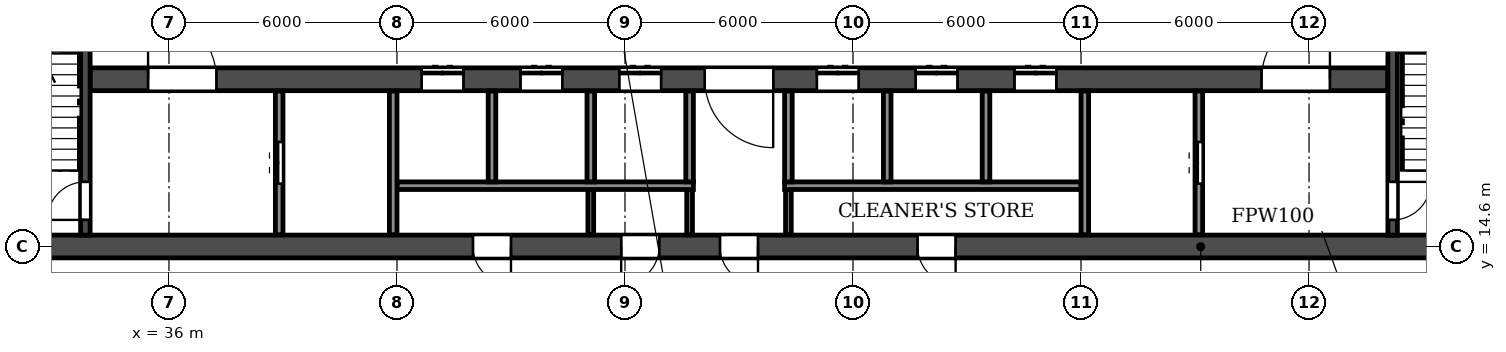
"""IFC4 building model, lengths in metres.
Left out: names, types, materials, properties, quantities, classifications, styles, units other than length and angle.
Written with IfcOpenShell. Run it as: python <this file> out.ifc"""

import sys

from ifc_helpers import new_model, si_unit, direction, frame, frame_2d, origin, place, context, subcontext, project, spatial, rectangle, extrude, element, fill, save


model = new_model("IFC4")
c1 = context("Model", 3, precision=1e-05, world=origin(), true_north=direction((0.0, 1.0)))
c2 = subcontext(c1, "Body", "Model", "MODEL_VIEW")
j1 = project(units=[si_unit("LENGTHUNIT", "METRE"), si_unit("PLANEANGLEUNIT", "RADIAN")], contexts=[c1])
p1 = place(None, origin())
s1 = spatial("IfcSite", under=j1, at=p1, CompositionType="ELEMENT")
p2 = place(p1, origin())
s2 = spatial("IfcBuilding", under=s1, at=p2, CompositionType="ELEMENT")
p3 = place(p2, frame((0.0, 0.0, 63.0)))
s3 = spatial("IfcBuildingStorey", under=s2, at=p3, CompositionType="ELEMENT", Elevation=63.0)
p4 = place(p3, frame((8.6, 14.6, 0.0), z_axis=(0.0, 0.0, 1.0), x_axis=(1.0, 0.0, 0.0)))
e1 = element("IfcWall", 1, at=p4, inside=s3, PredefinedType="SOLIDWALL", context=c2, shape_type="SweptSolid", body=[
    extrude(rectangle(XDim=84.8, YDim=0.6, at=frame_2d((42.4, 0.0))), origin(), (0.0, 0.0, 1.0), 2.95),
])
p5 = place(p4, frame((1.35, 0.0, 0.0)))
e2 = element("IfcOpeningElement", 2, at=p5, cuts=e1, PredefinedType="OPENING", context=c2, shape_type="SweptSolid", body=[
    extrude(rectangle(XDim=1.0, YDim=2.1, at=frame_2d((0.5, 1.05))), frame((0.0, 0.31, 0.0), z_axis=(0.0, -1.0, 0.0), x_axis=(1.0, 0.0, 0.0)), (0.0, 0.0, 1.0), 0.62),
])
p6 = place(p4, frame((6.05, 0.0, 0.0)))
e3 = element("IfcOpeningElement", 3, at=p6, cuts=e1, PredefinedType="OPENING", context=c2, shape_type="SweptSolid", body=[
    extrude(rectangle(XDim=1.0, YDim=2.1, at=frame_2d((0.5, 1.05))), frame((0.0, 0.31, 0.0), z_axis=(0.0, -1.0, 0.0), x_axis=(1.0, 0.0, 0.0)), (0.0, 0.0, 1.0), 0.62),
])
p7 = place(p4, frame((10.3, 0.0, 0.0)))
e4 = element("IfcOpeningElement", 4, at=p7, cuts=e1, PredefinedType="OPENING", context=c2, shape_type="SweptSolid", body=[
    extrude(rectangle(XDim=1.0, YDim=2.1, at=frame_2d((0.5, 1.05))), frame((0.0, 0.31, 0.0), z_axis=(0.0, -1.0, 0.0), x_axis=(1.0, 0.0, 0.0)), (0.0, 0.0, 1.0), 0.62),
])
p8 = place(p4, frame((18.2, 0.0, 0.0)))
e5 = element("IfcOpeningElement", 5, at=p8, cuts=e1, PredefinedType="OPENING", context=c2, shape_type="SweptSolid", body=[
    extrude(rectangle(XDim=1.0, YDim=2.1, at=frame_2d((0.5, 1.05))), frame((0.0, 0.31, 0.0), z_axis=(0.0, -1.0, 0.0), x_axis=(1.0, 0.0, 0.0)), (0.0, 0.0, 1.0), 0.62),
])
p9 = place(p4, frame((22.8, 0.0, 0.0)))
e6 = element("IfcOpeningElement", 6, at=p9, cuts=e1, PredefinedType="OPENING", context=c2, shape_type="SweptSolid", body=[
    extrude(rectangle(XDim=1.0, YDim=2.1, at=frame_2d((0.5, 1.05))), frame((0.0, 0.31, 0.0), z_axis=(0.0, -1.0, 0.0), x_axis=(1.0, 0.0, 0.0)), (0.0, 0.0, 1.0), 0.62),
])
p10 = place(p4, frame((35.4, 0.0, 0.0)))
e7 = element("IfcOpeningElement", 7, at=p10, cuts=e1, PredefinedType="OPENING", context=c2, shape_type="SweptSolid", body=[
    extrude(rectangle(XDim=1.0, YDim=2.1, at=frame_2d((0.5, 1.05))), frame((0.0, 0.31, 0.0), z_axis=(0.0, -1.0, 0.0), x_axis=(1.0, 0.0, 0.0)), (0.0, 0.0, 1.0), 0.62),
])
p11 = place(p4, frame((39.3, 0.0, 0.0)))
e8 = element("IfcOpeningElement", 8, at=p11, cuts=e1, PredefinedType="OPENING", context=c2, shape_type="SweptSolid", body=[
    extrude(rectangle(XDim=1.0, YDim=2.1, at=frame_2d((0.5, 1.05))), frame((0.0, 0.31, 0.0), z_axis=(0.0, -1.0, 0.0), x_axis=(1.0, 0.0, 0.0)), (0.0, 0.0, 1.0), 0.62),
])
p12 = place(p4, frame((41.9, 0.0, 0.0)))
e9 = element("IfcOpeningElement", 9, at=p12, cuts=e1, PredefinedType="OPENING", context=c2, shape_type="SweptSolid", body=[
    extrude(rectangle(XDim=1.0, YDim=2.1, at=frame_2d((0.5, 1.05))), frame((0.0, 0.31, 0.0), z_axis=(0.0, -1.0, 0.0), x_axis=(1.0, 0.0, 0.0)), (0.0, 0.0, 1.0), 0.62),
])
p13 = place(p4, frame((47.1, 0.0, 0.0)))
e10 = element("IfcOpeningElement", 10, at=p13, cuts=e1, PredefinedType="OPENING", context=c2, shape_type="SweptSolid", body=[
    extrude(rectangle(XDim=1.0, YDim=2.1, at=frame_2d((0.5, 1.05))), frame((0.0, 0.31, 0.0), z_axis=(0.0, -1.0, 0.0), x_axis=(1.0, 0.0, 0.0)), (0.0, 0.0, 1.0), 0.62),
])
p14 = place(p4, frame((61.0, 0.0, 0.0)))
e11 = element("IfcOpeningElement", 11, at=p14, cuts=e1, PredefinedType="OPENING", context=c2, shape_type="SweptSolid", body=[
    extrude(rectangle(XDim=1.0, YDim=2.1, at=frame_2d((0.5, 1.05))), frame((0.0, 0.31, 0.0), z_axis=(0.0, -1.0, 0.0), x_axis=(1.0, 0.0, 0.0)), (0.0, 0.0, 1.0), 0.62),
])
p15 = place(p4, frame((65.6, 0.0, 0.0)))
e12 = element("IfcOpeningElement", 12, at=p15, cuts=e1, PredefinedType="OPENING", context=c2, shape_type="SweptSolid", body=[
    extrude(rectangle(XDim=1.0, YDim=2.1, at=frame_2d((0.5, 1.05))), frame((0.0, 0.31, 0.0), z_axis=(0.0, -1.0, 0.0), x_axis=(1.0, 0.0, 0.0)), (0.0, 0.0, 1.0), 0.62),
])
p16 = place(p4, frame((73.5, 0.0, 0.0)))
e13 = element("IfcOpeningElement", 13, at=p16, cuts=e1, PredefinedType="OPENING", context=c2, shape_type="SweptSolid", body=[
    extrude(rectangle(XDim=1.0, YDim=2.1, at=frame_2d((0.5, 1.05))), frame((0.0, 0.31, 0.0), z_axis=(0.0, -1.0, 0.0), x_axis=(1.0, 0.0, 0.0)), (0.0, 0.0, 1.0), 0.62),
])
p17 = place(p4, frame((77.9, 0.0, 0.0)))
e14 = element("IfcOpeningElement", 14, at=p17, cuts=e1, PredefinedType="OPENING", context=c2, shape_type="SweptSolid", body=[
    extrude(rectangle(XDim=1.0, YDim=2.1, at=frame_2d((0.5, 1.05))), frame((0.0, 0.31, 0.0), z_axis=(0.0, -1.0, 0.0), x_axis=(1.0, 0.0, 0.0)), (0.0, 0.0, 1.0), 0.62),
])
p18 = place(p4, frame((82.6, 0.0, 0.0)))
e15 = element("IfcOpeningElement", 15, at=p18, cuts=e1, PredefinedType="OPENING", context=c2, shape_type="SweptSolid", body=[
    extrude(rectangle(XDim=1.0, YDim=2.1, at=frame_2d((0.5, 1.05))), frame((0.0, 0.31, 0.0), z_axis=(0.0, -1.0, 0.0), x_axis=(1.0, 0.0, 0.0)), (0.0, 0.0, 1.0), 0.62),
])
p19 = place(p3, frame((33.925, 19.0, 0.0), z_axis=(0.0, 0.0, 1.0), x_axis=(1.0, 0.0, 0.0)))
e16 = element("IfcWall", 16, at=p19, inside=s3, PredefinedType="SOLIDWALL", context=c2, shape_type="SweptSolid", body=[
    extrude(rectangle(XDim=34.15, YDim=0.6, at=frame_2d((17.075, 0.0))), origin(), (0.0, 0.0, 1.0), 2.95),
])
p20 = place(p19, frame((16.175, 0.0, 0.0)))
e17 = element("IfcOpeningElement", 17, at=p20, cuts=e16, PredefinedType="OPENING", context=c2, shape_type="SweptSolid", body=[
    extrude(rectangle(XDim=1.8, YDim=2.1, at=frame_2d((0.9, 1.05))), frame((0.0, 0.31, 0.0), z_axis=(0.0, -1.0, 0.0), x_axis=(1.0, 0.0, 0.0)), (0.0, 0.0, 1.0), 0.62),
])
p21 = place(p19, frame((1.525, 0.0, 0.0)))
e18 = element("IfcOpeningElement", 18, at=p21, cuts=e16, PredefinedType="OPENING", context=c2, shape_type="SweptSolid", body=[
    extrude(rectangle(XDim=1.8, YDim=2.1, at=frame_2d((0.9, 1.05))), frame((0.0, 0.31, 0.0), z_axis=(0.0, -1.0, 0.0), x_axis=(1.0, 0.0, 0.0)), (0.0, 0.0, 1.0), 0.62),
])
p22 = place(p19, frame((8.725, 0.0, 0.0)))
e19 = element("IfcOpeningElement", 19, at=p22, cuts=e16, PredefinedType="OPENING", context=c2, shape_type="SweptSolid", body=[
    extrude(rectangle(XDim=1.1, YDim=2.1, at=frame_2d((0.55, 1.05))), frame((0.0, 0.31, 0.0), z_axis=(0.0, -1.0, 0.0), x_axis=(1.0, 0.0, 0.0)), (0.0, 0.0, 1.0), 0.62),
])
p23 = place(p19, frame((11.325, 0.0, 0.0)))
e20 = element("IfcOpeningElement", 20, at=p23, cuts=e16, PredefinedType="OPENING", context=c2, shape_type="SweptSolid", body=[
    extrude(rectangle(XDim=1.1, YDim=2.1, at=frame_2d((0.55, 1.05))), frame((0.0, 0.31, 0.0), z_axis=(0.0, -1.0, 0.0), x_axis=(1.0, 0.0, 0.0)), (0.0, 0.0, 1.0), 0.62),
])
p24 = place(p19, frame((13.925, 0.0, 0.0)))
e21 = element("IfcOpeningElement", 21, at=p24, cuts=e16, PredefinedType="OPENING", context=c2, shape_type="SweptSolid", body=[
    extrude(rectangle(XDim=1.1, YDim=2.1, at=frame_2d((0.55, 1.05))), frame((0.0, 0.31, 0.0), z_axis=(0.0, -1.0, 0.0), x_axis=(1.0, 0.0, 0.0)), (0.0, 0.0, 1.0), 0.62),
])
p25 = place(p19, frame((19.125, 0.0, 0.0)))
e22 = element("IfcOpeningElement", 22, at=p25, cuts=e16, PredefinedType="OPENING", context=c2, shape_type="SweptSolid", body=[
    extrude(rectangle(XDim=1.1, YDim=2.1, at=frame_2d((0.55, 1.05))), frame((0.0, 0.31, 0.0), z_axis=(0.0, -1.0, 0.0), x_axis=(1.0, 0.0, 0.0)), (0.0, 0.0, 1.0), 0.62),
])
p26 = place(p19, frame((21.725, 0.0, 0.0)))
e23 = element("IfcOpeningElement", 23, at=p26, cuts=e16, PredefinedType="OPENING", context=c2, shape_type="SweptSolid", body=[
    extrude(rectangle(XDim=1.1, YDim=2.1, at=frame_2d((0.55, 1.05))), frame((0.0, 0.31, 0.0), z_axis=(0.0, -1.0, 0.0), x_axis=(1.0, 0.0, 0.0)), (0.0, 0.0, 1.0), 0.62),
])
p27 = place(p19, frame((24.325, 0.0, 0.0)))
e24 = element("IfcOpeningElement", 24, at=p27, cuts=e16, PredefinedType="OPENING", context=c2, shape_type="SweptSolid", body=[
    extrude(rectangle(XDim=1.1, YDim=2.1, at=frame_2d((0.55, 1.05))), frame((0.0, 0.31, 0.0), z_axis=(0.0, -1.0, 0.0), x_axis=(1.0, 0.0, 0.0)), (0.0, 0.0, 1.0), 0.62),
])
p28 = place(p19, frame((30.825, 0.0, 0.0)))
e25 = element("IfcOpeningElement", 25, at=p28, cuts=e16, PredefinedType="OPENING", context=c2, shape_type="SweptSolid", body=[
    extrude(rectangle(XDim=1.8, YDim=2.1, at=frame_2d((0.9, 1.05))), frame((0.0, 0.31, 0.0), z_axis=(0.0, -1.0, 0.0), x_axis=(1.0, 0.0, 0.0)), (0.0, 0.0, 1.0), 0.62),
])
p29 = place(p3, frame((33.8, 14.9, 0.0), z_axis=(0.0, 0.0, 1.0), x_axis=(0.0, 1.0, 0.0)))
e26 = element("IfcWall", 26, at=p29, inside=s3, PredefinedType="SOLIDWALL", context=c2, shape_type="SweptSolid", body=[
    extrude(rectangle(XDim=7.575, YDim=0.25, at=frame_2d((3.788, 0.0))), origin(), (0.0, 0.0, 1.0), 2.95),
])
p30 = place(p29, frame((0.4, 0.0, 0.0)))
e27 = element("IfcOpeningElement", 27, at=p30, cuts=e26, PredefinedType="OPENING", context=c2, shape_type="SweptSolid", body=[
    extrude(rectangle(XDim=1.0, YDim=2.1, at=frame_2d((0.5, 1.05))), frame((0.0, 0.135, 0.0), z_axis=(0.0, -1.0, 0.0), x_axis=(1.0, 0.0, 0.0)), (0.0, 0.0, 1.0), 0.27),
])
p31 = place(p3, frame((68.2, 14.9, 0.0), z_axis=(0.0, 0.0, 1.0), x_axis=(0.0, 1.0, 0.0)))
e28 = element("IfcWall", 28, at=p31, inside=s3, PredefinedType="SOLIDWALL", context=c2, shape_type="SweptSolid", body=[
    extrude(rectangle(XDim=7.575, YDim=0.25, at=frame_2d((3.788, 0.0))), origin(), (0.0, 0.0, 1.0), 2.95),
])
p32 = place(p31, frame((0.4, 0.0, 0.0)))
e29 = element("IfcOpeningElement", 29, at=p32, cuts=e28, PredefinedType="OPENING", context=c2, shape_type="SweptSolid", body=[
    extrude(rectangle(XDim=1.0, YDim=2.1, at=frame_2d((0.5, 1.05))), frame((0.0, 0.135, 0.0), z_axis=(0.0, -1.0, 0.0), x_axis=(1.0, 0.0, 0.0)), (0.0, 0.0, 1.0), 0.27),
])
for number, where, z_axis, x_axis in (
    (30, (49.7, 14.91, 0.0), (0.0, 0.0, 1.0), (0.0, 1.0, 0.0)),
    (31, (52.3, 14.91, 0.0), (0.0, 0.0, 1.0), (0.0, 1.0, 0.0)),
    (32, (47.1, 14.91, 0.0), (0.0, 0.0, 1.0), (0.0, 1.0, 0.0)),
):
    element("IfcWall", number, at=place(p3, frame(where, z_axis=z_axis, x_axis=x_axis)), inside=s3, PredefinedType="PARTITIONING", context=c2, shape_type="SweptSolid", body=[
        extrude(rectangle(XDim=1.19, YDim=0.15, at=frame_2d((0.595, 0.0))), origin(), (0.0, 0.0, 1.0), 2.95),
    ])
for number, where, z_axis, x_axis in (
    (33, (42.0, 16.2, 0.0), (0.0, 0.0, 1.0), (1.0, 0.0, 0.0)),
    (34, (52.2, 16.2, 0.0), (0.0, 0.0, 1.0), (1.0, 0.0, 0.0)),
):
    element("IfcWall", number, at=place(p3, frame(where, z_axis=z_axis, x_axis=x_axis)), inside=s3, PredefinedType="PARTITIONING", context=c2, shape_type="SweptSolid", body=[
        extrude(rectangle(XDim=7.8, YDim=0.2, at=frame_2d((3.9, 0.0))), origin(), (0.0, 0.0, 1.0), 2.95),
    ])
p33 = place(p3, frame((38.9, 14.91, 0.0), z_axis=(0.0, 0.0, 1.0), x_axis=(0.0, 1.0, 0.0)))
e35 = element("IfcWall", 35, at=p33, inside=s3, PredefinedType="PARTITIONING", context=c2, shape_type="SweptSolid", body=[
    extrude(rectangle(XDim=3.78, YDim=0.2, at=frame_2d((1.89, 0.0))), origin(), (0.0, 0.0, 1.0), 2.95),
])
p34 = place(p33, frame((1.34, 0.0, 0.0)))
e36 = element("IfcOpeningElement", 36, at=p34, cuts=e35, PredefinedType="OPENING", context=c2, shape_type="SweptSolid", body=[
    extrude(rectangle(XDim=1.1, YDim=2.1, at=frame_2d((0.55, 1.05))), frame((0.0, 0.11, 0.0), z_axis=(0.0, -1.0, 0.0), x_axis=(1.0, 0.0, 0.0)), (0.0, 0.0, 1.0), 0.22),
])
p35 = place(p3, frame((41.9, 14.91, 0.0), z_axis=(0.0, 0.0, 1.0), x_axis=(0.0, 1.0, 0.0)))
e37 = element("IfcWall", 37, at=p35, inside=s3, PredefinedType="PARTITIONING", context=c2, shape_type="SweptSolid", body=[
    extrude(rectangle(XDim=3.78, YDim=0.2, at=frame_2d((1.89, 0.0))), origin(), (0.0, 0.0, 1.0), 2.95),
])
for number, where, z_axis, x_axis in (
    (38, (44.5, 16.3, 0.0), (0.0, 0.0, 1.0), (0.0, 1.0, 0.0)),
    (39, (47.1, 16.3, 0.0), (0.0, 0.0, 1.0), (0.0, 1.0, 0.0)),
    (40, (49.7, 16.3, 0.0), (0.0, 0.0, 1.0), (0.0, 1.0, 0.0)),
    (41, (52.3, 16.3, 0.0), (0.0, 0.0, 1.0), (0.0, 1.0, 0.0)),
    (42, (54.9, 16.3, 0.0), (0.0, 0.0, 1.0), (0.0, 1.0, 0.0)),
    (43, (57.5, 16.3, 0.0), (0.0, 0.0, 1.0), (0.0, 1.0, 0.0)),
):
    element("IfcWall", number, at=place(p3, frame(where, z_axis=z_axis, x_axis=x_axis)), inside=s3, PredefinedType="PARTITIONING", context=c2, shape_type="SweptSolid", body=[
        extrude(rectangle(XDim=2.39, YDim=0.2, at=frame_2d((1.195, 0.0))), origin(), (0.0, 0.0, 1.0), 2.95),
    ])
p36 = place(p3, frame((60.1, 14.91, 0.0), z_axis=(0.0, 0.0, 1.0), x_axis=(0.0, 1.0, 0.0)))
e44 = element("IfcWall", 44, at=p36, inside=s3, PredefinedType="PARTITIONING", context=c2, shape_type="SweptSolid", body=[
    extrude(rectangle(XDim=3.78, YDim=0.2, at=frame_2d((1.89, 0.0))), origin(), (0.0, 0.0, 1.0), 2.95),
])
p37 = place(p3, frame((63.1, 14.91, 0.0), z_axis=(0.0, 0.0, 1.0), x_axis=(0.0, 1.0, 0.0)))
e45 = element("IfcWall", 45, at=p37, inside=s3, PredefinedType="PARTITIONING", context=c2, shape_type="SweptSolid", body=[
    extrude(rectangle(XDim=3.78, YDim=0.2, at=frame_2d((1.89, 0.0))), origin(), (0.0, 0.0, 1.0), 2.95),
])
p38 = place(p37, frame((1.34, 0.0, 0.0)))
e46 = element("IfcOpeningElement", 46, at=p38, cuts=e45, PredefinedType="OPENING", context=c2, shape_type="SweptSolid", body=[
    extrude(rectangle(XDim=1.1, YDim=2.1, at=frame_2d((0.55, 1.05))), frame((0.0, 0.11, 0.0), z_axis=(0.0, -1.0, 0.0), x_axis=(1.0, 0.0, 0.0)), (0.0, 0.0, 1.0), 0.22),
])
p39 = place(p10, frame((1.0, 0.0, 0.0), z_axis=(0.0, 0.0, 1.0), x_axis=(-1.0, 0.0, 0.0)))
e47 = element("IfcDoor", 47, at=p39, inside=s3, OperationType="SINGLE_SWING_LEFT", PredefinedType="DOOR", context=c2, shape_type="SweptSolid", body=[
    extrude(rectangle(XDim=1.0, YDim=2.1, at=frame_2d((0.5, 1.05))), frame((0.0, 0.025, 0.0), z_axis=(0.0, -1.0, 0.0), x_axis=(1.0, 0.0, 0.0)), (0.0, 0.0, 1.0), 0.05),
])
fill(e7, e47)
p40 = place(p11, frame((1.0, 0.0, 0.0), z_axis=(0.0, 0.0, 1.0), x_axis=(-1.0, 0.0, 0.0)))
e48 = element("IfcDoor", 48, at=p40, inside=s3, OperationType="SINGLE_SWING_RIGHT", PredefinedType="DOOR", context=c2, shape_type="SweptSolid", body=[
    extrude(rectangle(XDim=1.0, YDim=2.1, at=frame_2d((0.5, 1.05))), frame((0.0, 0.025, 0.0), z_axis=(0.0, -1.0, 0.0), x_axis=(1.0, 0.0, 0.0)), (0.0, 0.0, 1.0), 0.05),
])
fill(e8, e48)
p41 = place(p12, frame((1.0, 0.0, 0.0), z_axis=(0.0, 0.0, 1.0), x_axis=(-1.0, 0.0, 0.0)))
e49 = element("IfcDoor", 49, at=p41, inside=s3, OperationType="SINGLE_SWING_LEFT", PredefinedType="DOOR", context=c2, shape_type="SweptSolid", body=[
    extrude(rectangle(XDim=1.0, YDim=2.1, at=frame_2d((0.5, 1.05))), frame((0.0, 0.025, 0.0), z_axis=(0.0, -1.0, 0.0), x_axis=(1.0, 0.0, 0.0)), (0.0, 0.0, 1.0), 0.05),
])
fill(e9, e49)
p42 = place(p13, frame((1.0, 0.0, 0.0), z_axis=(0.0, 0.0, 1.0), x_axis=(-1.0, 0.0, 0.0)))
e50 = element("IfcDoor", 50, at=p42, inside=s3, OperationType="SINGLE_SWING_LEFT", PredefinedType="DOOR", context=c2, shape_type="SweptSolid", body=[
    extrude(rectangle(XDim=1.0, YDim=2.1, at=frame_2d((0.5, 1.05))), frame((0.0, 0.025, 0.0), z_axis=(0.0, -1.0, 0.0), x_axis=(1.0, 0.0, 0.0)), (0.0, 0.0, 1.0), 0.05),
])
fill(e10, e50)
p43 = place(p38, origin())
e51 = element("IfcDoor", 51, at=p43, inside=s3, OperationType="DOUBLE_DOOR_SLIDING", PredefinedType="DOOR", context=c2, shape_type="SweptSolid", body=[
    extrude(rectangle(XDim=1.1, YDim=2.1, at=frame_2d((0.55, 1.05))), frame((0.0, 0.025, 0.0), z_axis=(0.0, -1.0, 0.0), x_axis=(1.0, 0.0, 0.0)), (0.0, 0.0, 1.0), 0.05),
])
fill(e46, e51)
p44 = place(p32, frame((1.0, 0.0, 0.0), z_axis=(0.0, 0.0, 1.0), x_axis=(-1.0, 0.0, 0.0)))
e52 = element("IfcDoor", 52, at=p44, inside=s3, OperationType="SINGLE_SWING_LEFT", PredefinedType="DOOR", context=c2, shape_type="SweptSolid", body=[
    extrude(rectangle(XDim=1.0, YDim=2.1, at=frame_2d((0.5, 1.05))), frame((0.0, 0.025, 0.0), z_axis=(0.0, -1.0, 0.0), x_axis=(1.0, 0.0, 0.0)), (0.0, 0.0, 1.0), 0.05),
])
fill(e29, e52)
p45 = place(p30, origin())
e53 = element("IfcDoor", 53, at=p45, inside=s3, OperationType="SINGLE_SWING_LEFT", PredefinedType="DOOR", context=c2, shape_type="SweptSolid", body=[
    extrude(rectangle(XDim=1.0, YDim=2.1, at=frame_2d((0.5, 1.05))), frame((0.0, 0.025, 0.0), z_axis=(0.0, -1.0, 0.0), x_axis=(1.0, 0.0, 0.0)), (0.0, 0.0, 1.0), 0.05),
])
fill(e27, e53)
p46 = place(p34, origin())
e54 = element("IfcDoor", 54, at=p46, inside=s3, OperationType="DOUBLE_DOOR_SLIDING", PredefinedType="DOOR", context=c2, shape_type="SweptSolid", body=[
    extrude(rectangle(XDim=1.1, YDim=2.1, at=frame_2d((0.55, 1.05))), frame((0.0, 0.025, 0.0), z_axis=(0.0, -1.0, 0.0), x_axis=(1.0, 0.0, 0.0)), (0.0, 0.0, 1.0), 0.05),
])
fill(e36, e54)
p47 = place(p20, frame((1.8, 0.0, 0.0), z_axis=(0.0, 0.0, 1.0), x_axis=(-1.0, 0.0, 0.0)))
e55 = element("IfcDoor", 55, at=p47, inside=s3, OperationType="DOUBLE_DOOR_SINGLE_SWING", PredefinedType="DOOR", context=c2, shape_type="SweptSolid", body=[
    extrude(rectangle(XDim=1.8, YDim=2.1, at=frame_2d((0.9, 1.05))), frame((0.0, 0.025, 0.0), z_axis=(0.0, -1.0, 0.0), x_axis=(1.0, 0.0, 0.0)), (0.0, 0.0, 1.0), 0.05),
])
fill(e17, e55)
p48 = place(p21, origin())
e56 = element("IfcDoor", 56, at=p48, inside=s3, OperationType="DOUBLE_DOOR_SINGLE_SWING", PredefinedType="DOOR", context=c2, shape_type="SweptSolid", body=[
    extrude(rectangle(XDim=1.8, YDim=2.1, at=frame_2d((0.9, 1.05))), frame((0.0, 0.025, 0.0), z_axis=(0.0, -1.0, 0.0), x_axis=(1.0, 0.0, 0.0)), (0.0, 0.0, 1.0), 0.05),
])
fill(e18, e56)
p49 = place(p22, origin())
e57 = element("IfcDoor", 57, at=p49, inside=s3, OperationType="DOUBLE_DOOR_SLIDING", PredefinedType="DOOR", context=c2, shape_type="SweptSolid", body=[
    extrude(rectangle(XDim=1.1, YDim=2.1, at=frame_2d((0.55, 1.05))), frame((0.0, 0.025, 0.0), z_axis=(0.0, -1.0, 0.0), x_axis=(1.0, 0.0, 0.0)), (0.0, 0.0, 1.0), 0.05),
])
fill(e19, e57)
p50 = place(p23, origin())
e58 = element("IfcDoor", 58, at=p50, inside=s3, OperationType="DOUBLE_DOOR_SLIDING", PredefinedType="DOOR", context=c2, shape_type="SweptSolid", body=[
    extrude(rectangle(XDim=1.1, YDim=2.1, at=frame_2d((0.55, 1.05))), frame((0.0, 0.025, 0.0), z_axis=(0.0, -1.0, 0.0), x_axis=(1.0, 0.0, 0.0)), (0.0, 0.0, 1.0), 0.05),
])
fill(e20, e58)
p51 = place(p24, origin())
e59 = element("IfcDoor", 59, at=p51, inside=s3, OperationType="DOUBLE_DOOR_SLIDING", PredefinedType="DOOR", context=c2, shape_type="SweptSolid", body=[
    extrude(rectangle(XDim=1.1, YDim=2.1, at=frame_2d((0.55, 1.05))), frame((0.0, 0.025, 0.0), z_axis=(0.0, -1.0, 0.0), x_axis=(1.0, 0.0, 0.0)), (0.0, 0.0, 1.0), 0.05),
])
fill(e21, e59)
p52 = place(p25, origin())
e60 = element("IfcDoor", 60, at=p52, inside=s3, OperationType="DOUBLE_DOOR_SLIDING", PredefinedType="DOOR", context=c2, shape_type="SweptSolid", body=[
    extrude(rectangle(XDim=1.1, YDim=2.1, at=frame_2d((0.55, 1.05))), frame((0.0, 0.025, 0.0), z_axis=(0.0, -1.0, 0.0), x_axis=(1.0, 0.0, 0.0)), (0.0, 0.0, 1.0), 0.05),
])
fill(e22, e60)
p53 = place(p26, origin())
e61 = element("IfcDoor", 61, at=p53, inside=s3, OperationType="DOUBLE_DOOR_SLIDING", PredefinedType="DOOR", context=c2, shape_type="SweptSolid", body=[
    extrude(rectangle(XDim=1.1, YDim=2.1, at=frame_2d((0.55, 1.05))), frame((0.0, 0.025, 0.0), z_axis=(0.0, -1.0, 0.0), x_axis=(1.0, 0.0, 0.0)), (0.0, 0.0, 1.0), 0.05),
])
fill(e23, e61)
p54 = place(p27, origin())
e62 = element("IfcDoor", 62, at=p54, inside=s3, OperationType="DOUBLE_DOOR_SLIDING", PredefinedType="DOOR", context=c2, shape_type="SweptSolid", body=[
    extrude(rectangle(XDim=1.1, YDim=2.1, at=frame_2d((0.55, 1.05))), frame((0.0, 0.025, 0.0), z_axis=(0.0, -1.0, 0.0), x_axis=(1.0, 0.0, 0.0)), (0.0, 0.0, 1.0), 0.05),
])
fill(e24, e62)
p55 = place(p28, origin())
e63 = element("IfcDoor", 63, at=p55, inside=s3, OperationType="DOUBLE_DOOR_SINGLE_SWING", PredefinedType="DOOR", context=c2, shape_type="SweptSolid", body=[
    extrude(rectangle(XDim=1.8, YDim=2.1, at=frame_2d((0.9, 1.05))), frame((0.0, 0.025, 0.0), z_axis=(0.0, -1.0, 0.0), x_axis=(1.0, 0.0, 0.0)), (0.0, 0.0, 1.0), 0.05),
])
fill(e25, e63)
save(model, sys.argv[1])
